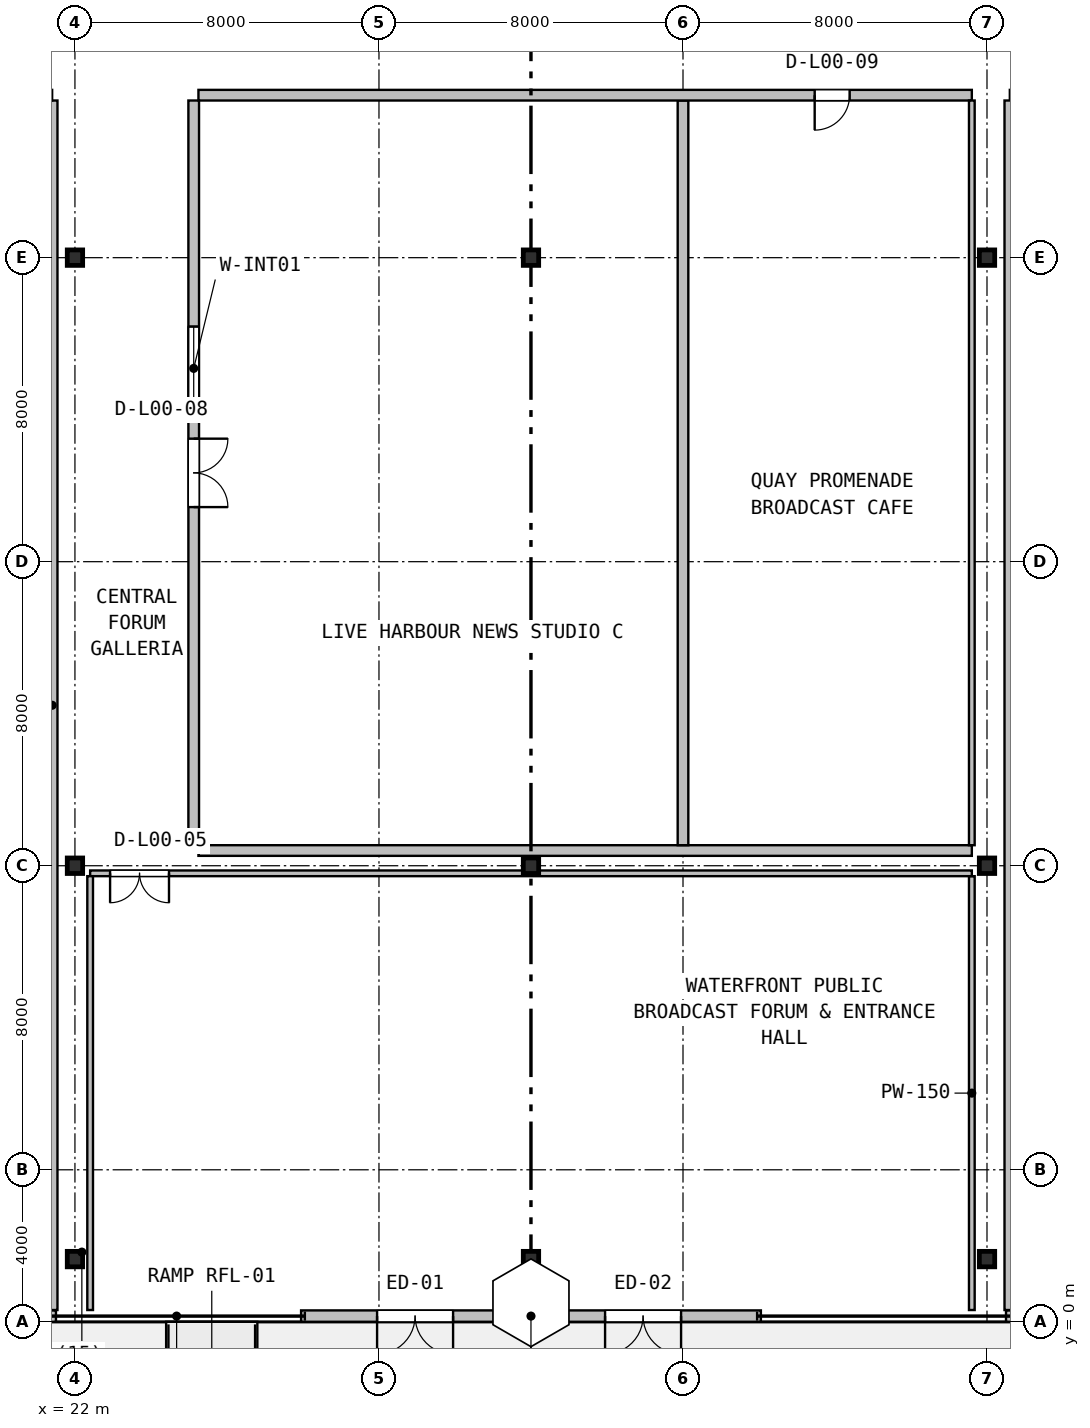
"""IFC4 building model, lengths in metres.
Left out: names, types, materials, properties, quantities, classifications, styles, units other than length and angle.
Written with IfcOpenShell. Run it as: python <this file> out.ifc"""

import sys

from ifc_helpers import new_model, si_unit, direction, frame, frame_2d, origin, origin_2d, place, context, subcontext, project, spatial, rectangle, i_section, extrude, source, transform, mapped, element, fill, save


model = new_model("IFC4")
c1 = context("Model", 3, precision=1e-05, world=origin(), true_north=direction((0.0, 1.0)))
c2 = subcontext(c1, "Body", "Model", "MODEL_VIEW")
j1 = project(units=[si_unit("LENGTHUNIT", "METRE"), si_unit("PLANEANGLEUNIT", "RADIAN")], contexts=[c1])
p1 = place(None, origin())
s1 = spatial("IfcSite", under=j1, at=p1, CompositionType="ELEMENT")
p2 = place(p1, origin())
s2 = spatial("IfcBuilding", under=s1, at=p2, CompositionType="ELEMENT")
p3 = place(p2, origin())
s3 = spatial("IfcBuildingStorey", under=s2, at=p3, CompositionType="ELEMENT", Elevation=0.0)
m1 = source(origin(), c2, "Body", "SweptSolid", [
    extrude(i_section(OverallWidth=0.404, OverallDepth=0.407, WebThickness=0.027, FlangeThickness=0.044, FilletRadius=0.018, at=origin_2d()), origin(), (0.0, 0.0, 1.0), 6.0),
])
for number, where, z_axis, x_axis in (
    (1, (22.0, 1.65, 0.0), (0.0, 0.0, 1.0), (1.0, 0.0, 0.0)),
    (2, (34.0, 1.65, 0.0), (0.0, 0.0, 1.0), (1.0, 0.0, 0.0)),
    (3, (46.0, 1.65, 0.0), (0.0, 0.0, 1.0), (1.0, 0.0, 0.0)),
    (4, (22.0, 12.0, 0.0), (0.0, 0.0, 1.0), (1.0, 0.0, 0.0)),
    (5, (34.0, 12.0, 0.0), (0.0, 0.0, 1.0), (1.0, 0.0, 0.0)),
    (6, (46.0, 12.0, 0.0), (0.0, 0.0, 1.0), (1.0, 0.0, 0.0)),
    (7, (22.0, 28.0, 0.0), (0.0, 0.0, 1.0), (1.0, 0.0, 0.0)),
    (8, (34.0, 28.0, 0.0), (0.0, 0.0, 1.0), (1.0, 0.0, 0.0)),
    (9, (46.0, 28.0, 0.0), (0.0, 0.0, 1.0), (1.0, 0.0, 0.0)),
):
    element("IfcColumn", number, at=place(p3, frame(where, z_axis=z_axis, x_axis=x_axis)), inside=s3, PredefinedType="COLUMN", context=c2, shape_type="MappedRepresentation", body=[
        mapped(m1, transform((0.0, 0.0, 0.0), x_axis=(1.0, 0.0, 0.0), y_axis=(0.0, 1.0, 0.0), z_axis=(0.0, 0.0, 1.0), scale=1.0)),
    ])
p4 = place(p3, frame((27.95, 0.15, 0.0), z_axis=(0.0, 0.0, 1.0), x_axis=(1.0, 0.0, 0.0)))
e10 = element("IfcWall", 10, at=p4, inside=s3, PredefinedType="SOLIDWALL", context=c2, shape_type="SweptSolid", body=[
    extrude(rectangle(XDim=12.1, YDim=0.3, at=frame_2d((6.05, 0.0))), origin(), (0.0, 0.0, 1.0), 5.7),
])
p5 = place(p4, frame((2.0, 0.0, 0.0)))
e11 = element("IfcOpeningElement", 11, at=p5, cuts=e10, PredefinedType="OPENING", context=c2, shape_type="SweptSolid", body=[
    extrude(rectangle(XDim=2.0, YDim=2.3, at=frame_2d((1.0, 1.15))), frame((0.0, 0.16, 0.0), z_axis=(0.0, -1.0, 0.0), x_axis=(1.0, 0.0, 0.0)), (0.0, 0.0, 1.0), 0.32),
])
p6 = place(p4, frame((8.0, 0.0, 0.0)))
e12 = element("IfcOpeningElement", 12, at=p6, cuts=e10, PredefinedType="OPENING", context=c2, shape_type="SweptSolid", body=[
    extrude(rectangle(XDim=2.0, YDim=2.3, at=frame_2d((1.0, 1.15))), frame((0.0, 0.16, 0.0), z_axis=(0.0, -1.0, 0.0), x_axis=(1.0, 0.0, 0.0)), (0.0, 0.0, 1.0), 0.32),
])
p7 = place(p3, frame((2.25, 0.15, 0.0), z_axis=(0.0, 0.0, 1.0), x_axis=(1.0, 0.0, 0.0)))
e13 = element("IfcWall", 13, at=p7, inside=s3, PredefinedType="SOLIDWALL", context=c2, shape_type="SweptSolid", body=[
    extrude(rectangle(XDim=19.25, YDim=0.3, at=frame_2d((9.625, 0.0))), origin(), (0.0, 0.0, 1.0), 5.7),
])
p8 = place(p7, frame((7.2, 0.0, 0.0)))
e14 = element("IfcOpeningElement", 14, at=p8, cuts=e13, PredefinedType="OPENING", context=c2, shape_type="SweptSolid", body=[
    extrude(rectangle(XDim=1.8, YDim=2.15, at=frame_2d((0.9, 1.075))), frame((0.0, 0.16, 0.0), z_axis=(0.0, -1.0, 0.0), x_axis=(1.0, 0.0, 0.0)), (0.0, 0.0, 1.0), 0.32),
])
p9 = place(p7, frame((3.0, 0.0, 0.9)))
e15 = element("IfcOpeningElement", 15, at=p9, cuts=e13, PredefinedType="OPENING", context=c2, shape_type="SweptSolid", body=[
    extrude(rectangle(XDim=2.4, YDim=2.4, at=frame_2d((1.2, 1.2))), frame((0.0, 0.16, 0.0), z_axis=(0.0, -1.0, 0.0), x_axis=(1.0, 0.0, 0.0)), (0.0, 0.0, 1.0), 0.32),
])
p10 = place(p7, frame((10.6, 0.0, 0.9)))
e16 = element("IfcOpeningElement", 16, at=p10, cuts=e13, PredefinedType="OPENING", context=c2, shape_type="SweptSolid", body=[
    extrude(rectangle(XDim=2.4, YDim=2.4, at=frame_2d((1.2, 1.2))), frame((0.0, 0.16, 0.0), z_axis=(0.0, -1.0, 0.0), x_axis=(1.0, 0.0, 0.0)), (0.0, 0.0, 1.0), 0.32),
])
p11 = place(p3, frame((46.5, 0.15, 0.0), z_axis=(0.0, 0.0, 1.0), x_axis=(1.0, 0.0, 0.0)))
e17 = element("IfcWall", 17, at=p11, inside=s3, PredefinedType="SOLIDWALL", context=c2, shape_type="SweptSolid", body=[
    extrude(rectangle(XDim=19.25, YDim=0.3, at=frame_2d((9.625, 0.0))), origin(), (0.0, 0.0, 1.0), 5.7),
])
p12 = place(p11, frame((14.5, 0.0, 0.0)))
e18 = element("IfcOpeningElement", 18, at=p12, cuts=e17, PredefinedType="OPENING", context=c2, shape_type="SweptSolid", body=[
    extrude(rectangle(XDim=1.8, YDim=2.15, at=frame_2d((0.9, 1.075))), frame((0.0, 0.16, 0.0), z_axis=(0.0, -1.0, 0.0), x_axis=(1.0, 0.0, 0.0)), (0.0, 0.0, 1.0), 0.32),
])
p13 = place(p11, frame((3.0, 0.0, 0.9)))
e19 = element("IfcOpeningElement", 19, at=p13, cuts=e17, PredefinedType="OPENING", context=c2, shape_type="SweptSolid", body=[
    extrude(rectangle(XDim=2.4, YDim=2.4, at=frame_2d((1.2, 1.2))), frame((0.0, 0.16, 0.0), z_axis=(0.0, -1.0, 0.0), x_axis=(1.0, 0.0, 0.0)), (0.0, 0.0, 1.0), 0.32),
])
p14 = place(p11, frame((10.6, 0.0, 0.9)))
e20 = element("IfcOpeningElement", 20, at=p14, cuts=e17, PredefinedType="OPENING", context=c2, shape_type="SweptSolid", body=[
    extrude(rectangle(XDim=2.4, YDim=2.4, at=frame_2d((1.2, 1.2))), frame((0.0, 0.16, 0.0), z_axis=(0.0, -1.0, 0.0), x_axis=(1.0, 0.0, 0.0)), (0.0, 0.0, 1.0), 0.32),
])
p15 = place(p3, frame((45.6, 0.31, 0.0), z_axis=(0.0, 0.0, 1.0), x_axis=(0.0, 1.0, 0.0)))
e21 = element("IfcWall", 21, at=p15, inside=s3, PredefinedType="PARTITIONING", context=c2, shape_type="SweptSolid", body=[
    extrude(rectangle(XDim=11.415, YDim=0.15, at=frame_2d((5.708, 0.0))), origin(), (0.0, 0.0, 1.0), 4.783),
])
p16 = place(p3, frame((22.4, 11.8, 0.0), z_axis=(0.0, 0.0, 1.0), x_axis=(1.0, 0.0, 0.0)))
e22 = element("IfcWall", 22, at=p16, inside=s3, PredefinedType="PARTITIONING", context=c2, shape_type="SweptSolid", body=[
    extrude(rectangle(XDim=23.2, YDim=0.15, at=frame_2d((11.6, 0.0))), origin(), (0.0, 0.0, 1.0), 4.783),
])
p17 = place(p16, frame((0.525, 0.0, 0.0)))
e23 = element("IfcOpeningElement", 23, at=p17, cuts=e22, PredefinedType="OPENING", context=c2, shape_type="SweptSolid", body=[
    extrude(rectangle(XDim=1.55, YDim=2.12, at=frame_2d((0.775, 1.06))), frame((0.0, 0.085, 0.0), z_axis=(0.0, -1.0, 0.0), x_axis=(1.0, 0.0, 0.0)), (0.0, 0.0, 1.0), 0.17),
])
p18 = place(p3, frame((22.4, 0.31, 0.0), z_axis=(0.0, 0.0, 1.0), x_axis=(0.0, 1.0, 0.0)))
e24 = element("IfcWall", 24, at=p18, inside=s3, PredefinedType="PARTITIONING", context=c2, shape_type="SweptSolid", body=[
    extrude(rectangle(XDim=11.415, YDim=0.15, at=frame_2d((5.708, 0.0))), origin(), (0.0, 0.0, 1.0), 4.783),
])
for number, where, z_axis, x_axis in (
    (25, (21.4, 0.31, 0.0), (0.0, 0.0, 1.0), (0.0, 1.0, 0.0)),
    (26, (46.6, 0.31, 0.0), (0.0, 0.0, 1.0), (0.0, 1.0, 0.0)),
):
    element("IfcWall", number, at=place(p3, frame(where, z_axis=z_axis, x_axis=x_axis)), inside=s3, PredefinedType="SOLIDWALL", context=c2, shape_type="SweptSolid", body=[
        extrude(rectangle(XDim=31.825, YDim=0.28, at=frame_2d((15.913, 0.0))), origin(), (0.0, 0.0, 1.0), 4.783),
    ])
p19 = place(p3, frame((25.25, 12.4, 0.0), z_axis=(0.0, 0.0, 1.0), x_axis=(1.0, 0.0, 0.0)))
e27 = element("IfcWall", 27, at=p19, inside=s3, PredefinedType="SOLIDWALL", context=c2, shape_type="SweptSolid", body=[
    extrude(rectangle(XDim=20.35, YDim=0.28, at=frame_2d((10.175, 0.0))), origin(), (0.0, 0.0, 1.0), 5.7),
])
p20 = place(p3, frame((38.0, 12.54, 0.0), z_axis=(0.0, 0.0, 1.0), x_axis=(0.0, 1.0, 0.0)))
e28 = element("IfcWall", 28, at=p20, inside=s3, PredefinedType="SOLIDWALL", context=c2, shape_type="SweptSolid", body=[
    extrude(rectangle(XDim=19.595, YDim=0.28, at=frame_2d((9.797, 0.0))), origin(), (0.0, 0.0, 1.0), 4.783),
])
p21 = place(p3, frame((25.25, 32.275, 0.0), z_axis=(0.0, 0.0, 1.0), x_axis=(1.0, 0.0, 0.0)))
e29 = element("IfcWall", 29, at=p21, inside=s3, PredefinedType="SOLIDWALL", context=c2, shape_type="SweptSolid", body=[
    extrude(rectangle(XDim=20.35, YDim=0.28, at=frame_2d((10.175, 0.0))), origin(), (0.0, 0.0, 1.0), 4.783),
])
p22 = place(p21, frame((16.215, 0.0, 0.0)))
e30 = element("IfcOpeningElement", 30, at=p22, cuts=e29, PredefinedType="OPENING", context=c2, shape_type="SweptSolid", body=[
    extrude(rectangle(XDim=0.92, YDim=2.08, at=frame_2d((0.46, 1.04))), frame((0.0, 0.15, 0.0), z_axis=(0.0, -1.0, 0.0), x_axis=(1.0, 0.0, 0.0)), (0.0, 0.0, 1.0), 0.3),
])
p23 = place(p3, frame((25.125, 12.54, 0.0), z_axis=(0.0, 0.0, 1.0), x_axis=(0.0, 1.0, 0.0)))
e31 = element("IfcWall", 31, at=p23, inside=s3, PredefinedType="SOLIDWALL", context=c2, shape_type="SweptSolid", body=[
    extrude(rectangle(XDim=19.595, YDim=0.28, at=frame_2d((9.797, 0.0))), origin(), (0.0, 0.0, 1.0), 4.783),
])
p24 = place(p23, frame((8.897, 0.0, 0.0)))
e32 = element("IfcOpeningElement", 32, at=p24, cuts=e31, PredefinedType="OPENING", context=c2, shape_type="SweptSolid", body=[
    extrude(rectangle(XDim=1.8, YDim=2.25, at=frame_2d((0.9, 1.125))), frame((0.0, 0.15, 0.0), z_axis=(0.0, -1.0, 0.0), x_axis=(1.0, 0.0, 0.0)), (0.0, 0.0, 1.0), 0.3),
])
p25 = place(p23, frame((11.447, 0.0, 0.95)))
e33 = element("IfcOpeningElement", 33, at=p25, cuts=e31, PredefinedType="OPENING", context=c2, shape_type="SweptSolid", body=[
    extrude(rectangle(XDim=2.2, YDim=1.3, at=frame_2d((1.1, 0.65))), frame((0.0, 0.15, 0.0), z_axis=(0.0, -1.0, 0.0), x_axis=(1.0, 0.0, 0.0)), (0.0, 0.0, 1.0), 0.3),
])
p26 = place(p3, frame((45.6, 12.54, 0.0), z_axis=(0.0, 0.0, 1.0), x_axis=(0.0, 1.0, 0.0)))
e34 = element("IfcWall", 34, at=p26, inside=s3, PredefinedType="PARTITIONING", context=c2, shape_type="SweptSolid", body=[
    extrude(rectangle(XDim=19.595, YDim=0.15, at=frame_2d((9.797, 0.0))), origin(), (0.0, 0.0, 1.0), 4.783),
])
m2 = source(origin(), c2, "Body", "SweptSolid", [
    extrude(rectangle(XDim=2.0, YDim=2.3, at=frame_2d((1.0, 1.15))), frame((0.0, 0.025, 0.0), z_axis=(0.0, -1.0, 0.0), x_axis=(1.0, 0.0, 0.0)), (0.0, 0.0, 1.0), 0.05),
])
p27 = place(p5, frame((2.0, 0.0, 0.0), z_axis=(0.0, 0.0, 1.0), x_axis=(-1.0, 0.0, 0.0)))
e35 = element("IfcDoor", 35, at=p27, inside=s3, OperationType="DOUBLE_DOOR_SINGLE_SWING", PredefinedType="DOOR", context=c2, shape_type="MappedRepresentation", body=[
    mapped(m2, transform((0.0, 0.0, 0.0), x_axis=(1.0, 0.0, 0.0), y_axis=(0.0, 1.0, 0.0), z_axis=(0.0, 0.0, 1.0), scale=1.0)),
])
fill(e11, e35)
p28 = place(p6, frame((2.0, 0.0, 0.0), z_axis=(0.0, 0.0, 1.0), x_axis=(-1.0, 0.0, 0.0)))
e36 = element("IfcDoor", 36, at=p28, inside=s3, OperationType="DOUBLE_DOOR_SINGLE_SWING", PredefinedType="DOOR", context=c2, shape_type="MappedRepresentation", body=[
    mapped(m2, transform((0.0, 0.0, 0.0), x_axis=(1.0, 0.0, 0.0), y_axis=(0.0, 1.0, 0.0), z_axis=(0.0, 0.0, 1.0), scale=1.0)),
])
fill(e12, e36)
m3 = source(origin(), c2, "Body", "SweptSolid", [
    extrude(rectangle(XDim=1.55, YDim=2.12, at=frame_2d((0.775, 1.06))), frame((0.0, 0.025, 0.0), z_axis=(0.0, -1.0, 0.0), x_axis=(1.0, 0.0, 0.0)), (0.0, 0.0, 1.0), 0.05),
])
p29 = place(p17, frame((1.55, 0.0, 0.0), z_axis=(0.0, 0.0, 1.0), x_axis=(-1.0, 0.0, 0.0)))
e37 = element("IfcDoor", 37, at=p29, inside=s3, OperationType="DOUBLE_DOOR_SINGLE_SWING", PredefinedType="DOOR", context=c2, shape_type="MappedRepresentation", body=[
    mapped(m3, transform((0.0, 0.0, 0.0), x_axis=(1.0, 0.0, 0.0), y_axis=(0.0, 1.0, 0.0), z_axis=(0.0, 0.0, 1.0), scale=1.0)),
])
fill(e23, e37)
m4 = source(origin(), c2, "Body", "SweptSolid", [
    extrude(rectangle(XDim=1.8, YDim=2.25, at=frame_2d((0.9, 1.125))), frame((0.0, 0.025, 0.0), z_axis=(0.0, -1.0, 0.0), x_axis=(1.0, 0.0, 0.0)), (0.0, 0.0, 1.0), 0.05),
])
p30 = place(p24, frame((1.8, 0.0, 0.0), z_axis=(0.0, 0.0, 1.0), x_axis=(-1.0, 0.0, 0.0)))
e38 = element("IfcDoor", 38, at=p30, inside=s3, OperationType="DOUBLE_DOOR_SINGLE_SWING", PredefinedType="DOOR", context=c2, shape_type="MappedRepresentation", body=[
    mapped(m4, transform((0.0, 0.0, 0.0), x_axis=(1.0, 0.0, 0.0), y_axis=(0.0, 1.0, 0.0), z_axis=(0.0, 0.0, 1.0), scale=1.0)),
])
fill(e32, e38)
m5 = source(origin(), c2, "Body", "SweptSolid", [
    extrude(rectangle(XDim=2.2, YDim=1.3, at=frame_2d((1.1, 0.65))), frame((0.0, 0.03, 0.0), z_axis=(0.0, -1.0, 0.0), x_axis=(1.0, 0.0, 0.0)), (0.0, 0.0, 1.0), 0.06),
])
p31 = place(p25, origin())
e39 = element("IfcWindow", 39, at=p31, inside=s3, PartitioningType="SINGLE_PANEL", PredefinedType="WINDOW", context=c2, shape_type="MappedRepresentation", body=[
    mapped(m5, transform((0.0, 0.0, 0.0), x_axis=(1.0, 0.0, 0.0), y_axis=(0.0, 1.0, 0.0), z_axis=(0.0, 0.0, 1.0), scale=1.0)),
])
fill(e33, e39)
m6 = source(origin(), c2, "Body", "SweptSolid", [
    extrude(rectangle(XDim=0.92, YDim=2.08, at=frame_2d((0.46, 1.04))), frame((0.0, 0.025, 0.0), z_axis=(0.0, -1.0, 0.0), x_axis=(1.0, 0.0, 0.0)), (0.0, 0.0, 1.0), 0.05),
])
p32 = place(p22, frame((0.92, 0.0, 0.0), z_axis=(0.0, 0.0, 1.0), x_axis=(-1.0, 0.0, 0.0)))
e40 = element("IfcDoor", 40, at=p32, inside=s3, OperationType="SINGLE_SWING_LEFT", PredefinedType="DOOR", context=c2, shape_type="MappedRepresentation", body=[
    mapped(m6, transform((0.0, 0.0, 0.0), x_axis=(1.0, 0.0, 0.0), y_axis=(0.0, 1.0, 0.0), z_axis=(0.0, 0.0, 1.0), scale=1.0)),
])
fill(e30, e40)
save(model, sys.argv[1])
